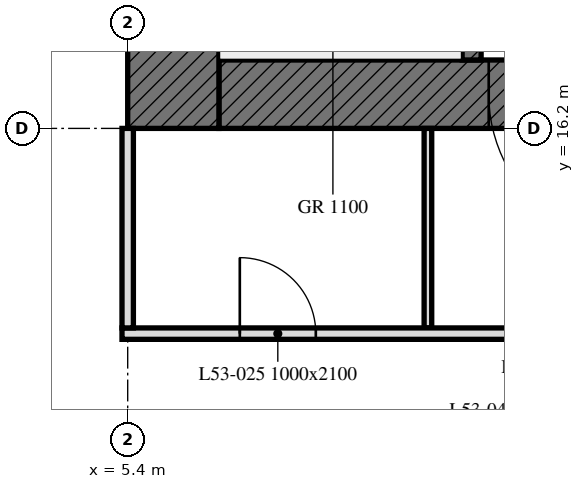
"""IFC4 building model, lengths in metres.
Left out: names, types, materials, properties, quantities, classifications, styles, units other than length and angle.
Written with IfcOpenShell. Run it as: python <this file> out.ifc"""

import sys

from ifc_helpers import new_model, si_unit, direction, frame, frame_2d, origin, place, context, subcontext, project, spatial, rectangle, extrude, element, fill, save


model = new_model("IFC4")
c1 = context("Model", 3, precision=1e-05, world=origin(), true_north=direction((0.0, 1.0)))
c2 = subcontext(c1, "Body", "Model", "MODEL_VIEW")
j1 = project(units=[si_unit("LENGTHUNIT", "METRE"), si_unit("PLANEANGLEUNIT", "RADIAN")], contexts=[c1])
p1 = place(None, origin())
s1 = spatial("IfcSite", under=j1, at=p1, CompositionType="ELEMENT")
p2 = place(p1, origin())
s2 = spatial("IfcBuilding", under=s1, at=p2, CompositionType="ELEMENT")
p3 = place(p2, frame((0.0, 0.0, 213.7)))
s3 = spatial("IfcBuildingStorey", under=s2, at=p3, CompositionType="ELEMENT", Elevation=213.7)
p4 = place(p3, frame((17.7, 16.65, 0.0), z_axis=(0.0, 0.0, 1.0), x_axis=(-1.0, 0.0, 0.0)))
e1 = element("IfcWall", 1, at=p4, inside=s3, PredefinedType="SOLIDWALL", context=c2, shape_type="SweptSolid", body=[
    extrude(rectangle(XDim=11.1, YDim=0.9, at=frame_2d((5.55, 0.0))), origin(), (0.0, 0.0, 1.0), 3.0),
])
p5 = place(p4, frame((5.55, 0.0, 0.0)))
e2 = element("IfcOpeningElement", 2, at=p5, cuts=e1, PredefinedType="OPENING", context=c2, shape_type="SweptSolid", body=[
    extrude(rectangle(XDim=2.0, YDim=2.4, at=frame_2d((1.0, 1.2))), frame((0.0, 0.45, 0.0), z_axis=(0.0, -1.0, 0.0), x_axis=(1.0, 0.0, 0.0)), (0.0, 0.0, 1.0), 0.9),
])
p6 = place(p3, frame((6.0, 16.2, 0.0), z_axis=(0.0, 0.0, 1.0), x_axis=(0.0, 1.0, 0.0)))
e3 = element("IfcWall", 3, at=p6, inside=s3, PredefinedType="SOLIDWALL", context=c2, shape_type="SweptSolid", body=[
    extrude(rectangle(XDim=16.2, YDim=1.2, at=frame_2d((8.1, 0.0))), origin(), (0.0, 0.0, 1.0), 3.0),
])
p7 = place(p3, frame((9.925, 17.1, 0.0), z_axis=(0.0, 0.0, 1.0), x_axis=(0.0, 1.0, 0.0)))
e4 = element("IfcWall", 4, at=p7, inside=s3, PredefinedType="SOLIDWALL", context=c2, shape_type="SweptSolid", body=[
    extrude(rectangle(XDim=14.4, YDim=0.25, at=frame_2d((7.2, 0.0))), origin(), (0.0, 0.0, 1.0), 3.0),
])
p8 = place(p7, frame((4.6, 0.0, 0.0)))
e5 = element("IfcOpeningElement", 5, at=p8, cuts=e4, PredefinedType="OPENING", context=c2, shape_type="SweptSolid", body=[
    extrude(rectangle(XDim=1.0, YDim=2.1, at=frame_2d((0.5, 1.05))), frame((0.0, 0.125, 0.0), z_axis=(0.0, -1.0, 0.0), x_axis=(1.0, 0.0, 0.0)), (0.0, 0.0, 1.0), 0.25),
])
p9 = place(p7, frame((7.062, 0.0, 0.0)))
e6 = element("IfcOpeningElement", 6, at=p9, cuts=e4, PredefinedType="OPENING", context=c2, shape_type="SweptSolid", body=[
    extrude(rectangle(XDim=1.2, YDim=2.1, at=frame_2d((0.6, 1.05))), frame((0.0, 0.125, 0.0), z_axis=(0.0, -1.0, 0.0), x_axis=(1.0, 0.0, 0.0)), (0.0, 0.0, 1.0), 0.25),
])
p10 = place(p7, frame((9.472, 0.0, 0.0)))
e7 = element("IfcOpeningElement", 7, at=p10, cuts=e4, PredefinedType="OPENING", context=c2, shape_type="SweptSolid", body=[
    extrude(rectangle(XDim=0.9, YDim=2.1, at=frame_2d((0.45, 1.05))), frame((0.0, 0.125, 0.0), z_axis=(0.0, -1.0, 0.0), x_axis=(1.0, 0.0, 0.0)), (0.0, 0.0, 1.0), 0.25),
])
p11 = place(p7, frame((11.159, 0.0, 0.0)))
e8 = element("IfcOpeningElement", 8, at=p11, cuts=e4, PredefinedType="OPENING", context=c2, shape_type="SweptSolid", body=[
    extrude(rectangle(XDim=0.9, YDim=2.1, at=frame_2d((0.45, 1.05))), frame((0.0, 0.125, 0.0), z_axis=(0.0, -1.0, 0.0), x_axis=(1.0, 0.0, 0.0)), (0.0, 0.0, 1.0), 0.25),
])
p12 = place(p7, frame((13.1, 0.0, 0.0)))
e9 = element("IfcOpeningElement", 9, at=p12, cuts=e4, PredefinedType="OPENING", context=c2, shape_type="SweptSolid", body=[
    extrude(rectangle(XDim=0.9, YDim=2.1, at=frame_2d((0.45, 1.05))), frame((0.0, 0.125, 0.0), z_axis=(0.0, -1.0, 0.0), x_axis=(1.0, 0.0, 0.0)), (0.0, 0.0, 1.0), 0.25),
])
p13 = place(p3, frame((9.35, 16.2, 0.0), z_axis=(0.0, 0.0, 1.0), x_axis=(0.0, -1.0, 0.0)))
e10 = element("IfcWall", 10, at=p13, inside=s3, PredefinedType="PARTITIONING", context=c2, shape_type="SweptSolid", body=[
    extrude(rectangle(XDim=2.625, YDim=0.1, at=frame_2d((1.312, 0.0))), origin(), (0.0, 0.0, 1.0), 3.0),
])
p14 = place(p3, frame((5.325, 13.5, 0.0), z_axis=(0.0, 0.0, 1.0), x_axis=(1.0, 0.0, 0.0)))
e11 = element("IfcWall", 11, at=p14, inside=s3, PredefinedType="PARTITIONING", context=c2, shape_type="SweptSolid", body=[
    extrude(rectangle(XDim=7.525, YDim=0.15, at=frame_2d((3.763, 0.0))), origin(), (0.0, 0.0, 1.0), 3.0),
])
p15 = place(p14, frame((1.55, 0.0, 0.0)))
e12 = element("IfcOpeningElement", 12, at=p15, cuts=e11, PredefinedType="OPENING", context=c2, shape_type="SweptSolid", body=[
    extrude(rectangle(XDim=1.0, YDim=2.1, at=frame_2d((0.5, 1.05))), frame((0.0, 0.075, 0.0), z_axis=(0.0, -1.0, 0.0), x_axis=(1.0, 0.0, 0.0)), (0.0, 0.0, 1.0), 0.15),
])
p16 = place(p14, frame((5.475, 0.0, 0.0)))
e13 = element("IfcOpeningElement", 13, at=p16, cuts=e11, PredefinedType="OPENING", context=c2, shape_type="SweptSolid", body=[
    extrude(rectangle(XDim=1.8, YDim=2.4, at=frame_2d((0.9, 1.2))), frame((0.0, 0.075, 0.0), z_axis=(0.0, -1.0, 0.0), x_axis=(1.0, 0.0, 0.0)), (0.0, 0.0, 1.0), 0.15),
])
p17 = place(p3, frame((5.4, 13.575, 0.0), z_axis=(0.0, 0.0, 1.0), x_axis=(0.0, 1.0, 0.0)))
e14 = element("IfcWall", 14, at=p17, inside=s3, PredefinedType="PARTITIONING", context=c2, shape_type="SweptSolid", body=[
    extrude(rectangle(XDim=2.625, YDim=0.15, at=frame_2d((1.312, 0.0))), origin(), (0.0, 0.0, 1.0), 3.0),
])
p18 = place(p5, origin())
e15 = element("IfcDoor", 15, at=p18, inside=s3, OperationType="DOUBLE_DOOR_SINGLE_SWING", PredefinedType="DOOR", context=c2, shape_type="SweptSolid", body=[
    extrude(rectangle(XDim=2.0, YDim=2.4, at=frame_2d((1.0, 1.2))), frame((0.0, 0.025, 0.0), z_axis=(0.0, -1.0, 0.0), x_axis=(1.0, 0.0, 0.0)), (0.0, 0.0, 1.0), 0.05),
])
fill(e2, e15)
p19 = place(p15, origin())
e16 = element("IfcDoor", 16, at=p19, inside=s3, OperationType="SINGLE_SWING_LEFT", PredefinedType="DOOR", context=c2, shape_type="SweptSolid", body=[
    extrude(rectangle(XDim=1.0, YDim=2.1, at=frame_2d((0.5, 1.05))), frame((0.0, 0.025, 0.0), z_axis=(0.0, -1.0, 0.0), x_axis=(1.0, 0.0, 0.0)), (0.0, 0.0, 1.0), 0.05),
])
fill(e12, e16)
save(model, sys.argv[1])
